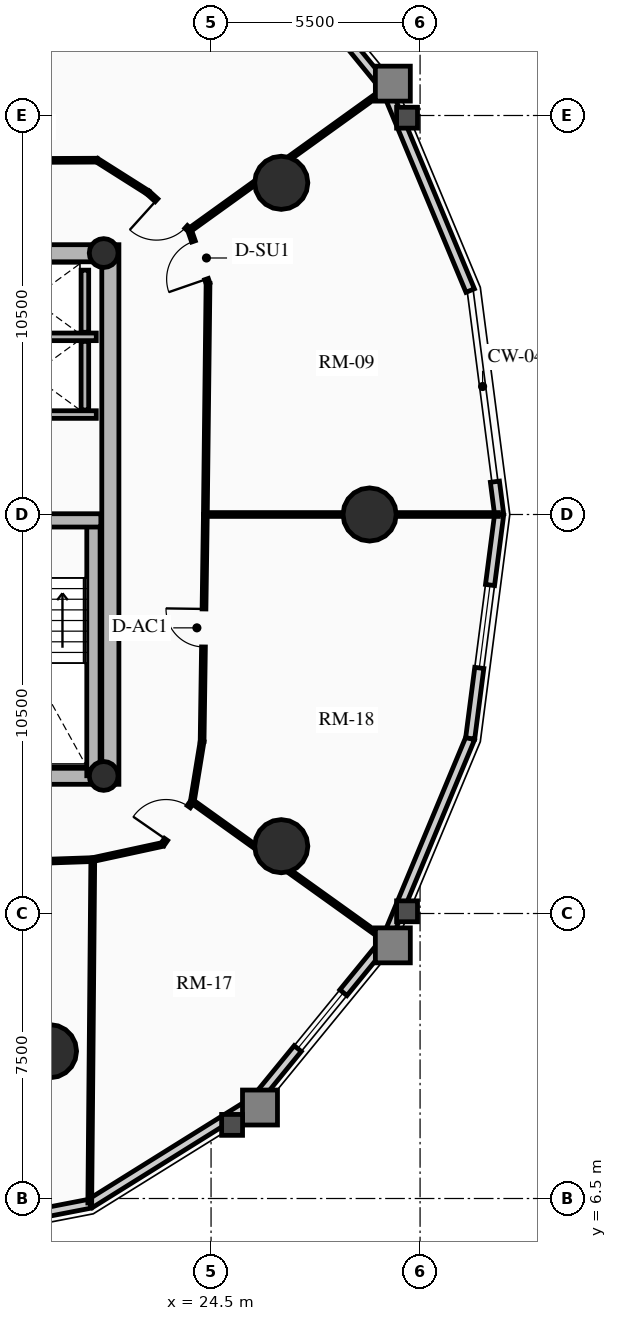
"""IFC4 building model, lengths in metres.
Left out: names, types, materials, properties, quantities, classifications, styles, units other than length and angle.
Written with IfcOpenShell. Run it as: python <this file> out.ifc"""

import sys

from ifc_helpers import new_model, si_unit, direction, frame, frame_2d, origin, origin_2d, place, context, subcontext, project, spatial, rectangle, circle, hollow_circle, extrude, source, transform, mapped, element, fill, save


model = new_model("IFC4")
c1 = context("Model", 3, precision=1e-05, world=origin(), true_north=direction((0.0, 1.0)))
c2 = subcontext(c1, "Body", "Model", "MODEL_VIEW")
j1 = project(units=[si_unit("LENGTHUNIT", "METRE"), si_unit("PLANEANGLEUNIT", "RADIAN")], contexts=[c1])
p1 = place(None, origin())
s1 = spatial("IfcSite", under=j1, at=p1, CompositionType="ELEMENT")
p2 = place(p1, origin())
s2 = spatial("IfcBuilding", under=s1, at=p2, CompositionType="ELEMENT")
p3 = place(p2, frame((0.0, 0.0, 102.16)))
s3 = spatial("IfcBuildingStorey", under=s2, at=p3, CompositionType="ELEMENT", Elevation=102.16)
p4 = place(p3, frame((21.85, 17.4, 0.0), z_axis=(0.0, 0.0, 1.0), x_axis=(0.0, 1.0, 0.0)))
e1 = element("IfcWall", 1, at=p4, inside=s3, PredefinedType="SHEAR", context=c2, shape_type="SweptSolid", body=[
    extrude(rectangle(XDim=14.2, YDim=0.45, at=frame_2d((7.1, 0.0))), origin(), (0.0, 0.0, 1.0), 2.91),
])
p5 = place(p3, frame((11.15, 17.625, 0.0), z_axis=(0.0, 0.0, 1.0), x_axis=(1.0, 0.0, 0.0)))
e2 = element("IfcWall", 2, at=p5, inside=s3, PredefinedType="SHEAR", context=c2, shape_type="SweptSolid", body=[
    extrude(rectangle(XDim=10.7, YDim=0.45, at=frame_2d((5.35, 0.0))), origin(), (0.0, 0.0, 1.0), 2.91),
])
m1 = source(origin(), c2, "Body", "SweptSolid", [
    extrude(rectangle(XDim=1.5, YDim=2.02, at=frame_2d((0.75, 1.01))), frame((0.0, 0.235, 0.0), z_axis=(0.0, -1.0, 0.0), x_axis=(1.0, 0.0, 0.0)), (0.0, 0.0, 1.0), 0.47),
])
p6 = place(p5, frame((5.45, 0.0, 0.0)))
e3 = element("IfcOpeningElement", 3, at=p6, cuts=e2, PredefinedType="OPENING", context=c2, shape_type="MappedRepresentation", body=[
    mapped(m1, transform((0.0, 0.0, 0.0), x_axis=(1.0, 0.0, 0.0), y_axis=(0.0, 1.0, 0.0), z_axis=(0.0, 0.0, 1.0), scale=1.0)),
])
p7 = place(p3, frame((11.15, 31.375, 0.0), z_axis=(0.0, 0.0, 1.0), x_axis=(1.0, 0.0, 0.0)))
e4 = element("IfcWall", 4, at=p7, inside=s3, PredefinedType="SHEAR", context=c2, shape_type="SweptSolid", body=[
    extrude(rectangle(XDim=10.7, YDim=0.45, at=frame_2d((5.35, 0.0))), origin(), (0.0, 0.0, 1.0), 2.91),
])
p8 = place(p7, frame((4.6, 0.0, 0.0)))
e5 = element("IfcOpeningElement", 5, at=p8, cuts=e4, PredefinedType="OPENING", context=c2, shape_type="MappedRepresentation", body=[
    mapped(m1, transform((0.0, 0.0, 0.0), x_axis=(1.0, 0.0, 0.0), y_axis=(0.0, 1.0, 0.0), z_axis=(0.0, 0.0, 1.0), scale=1.0)),
])
p9 = place(p3, frame((21.405, 17.625, 0.0), z_axis=(0.0, 0.0, 1.0), x_axis=(0.0, 1.0, 0.0)))
e6 = element("IfcWall", 6, at=p9, inside=s3, PredefinedType="SHEAR", context=c2, shape_type="SweptSolid", body=[
    extrude(rectangle(XDim=6.72, YDim=0.35, at=frame_2d((3.36, 0.0))), origin(), (0.0, 0.0, 1.0), 2.91),
])
p10 = place(p3, frame((18.315, 24.345, 0.0), z_axis=(0.0, 0.0, 1.0), x_axis=(1.0, 0.0, 0.0)))
e7 = element("IfcWall", 7, at=p10, inside=s3, PredefinedType="SHEAR", context=c2, shape_type="SweptSolid", body=[
    extrude(rectangle(XDim=3.285, YDim=0.35, at=frame_2d((1.643, 0.0))), origin(), (0.0, 0.0, 1.0), 2.91),
])
for number, where, z_axis, x_axis in (
    (8, (21.675, 17.62, 0.0), (0.0, 0.0, 1.0), (1.0, 0.0, 0.0)),
    (9, (21.675, 31.38, 0.0), (0.0, 0.0, 1.0), (1.0, 0.0, 0.0)),
):
    element("IfcColumn", number, at=place(p3, frame(where, z_axis=z_axis, x_axis=x_axis)), inside=s3, PredefinedType="COLUMN", context=c2, shape_type="SweptSolid", body=[
        extrude(hollow_circle(Radius=0.38, WallThickness=0.032, at=origin_2d()), origin(), (0.0, 0.0, 1.0), 2.91),
    ])
for number, where, z_axis, x_axis in (
    (10, (28.672, 24.5, 0.0), (0.0, 0.0, 1.0), (1.0, 0.0, 0.0)),
    (11, (26.347, 33.229, 0.0), (0.0, 0.0, 1.0), (1.0, 0.0, 0.0)),
    (12, (20.261, 10.377, 0.0), (0.0, 0.0, 1.0), (1.0, 0.0, 0.0)),
    (13, (26.347, 15.771, 0.0), (0.0, 0.0, 1.0), (1.0, 0.0, 0.0)),
):
    element("IfcColumn", number, at=place(p3, frame(where, z_axis=z_axis, x_axis=x_axis)), inside=s3, PredefinedType="USERDEFINED", context=c2, shape_type="SweptSolid", body=[
        extrude(circle(Radius=0.7, at=origin_2d()), origin(), (0.0, 0.0, 1.0), 2.91),
    ])
p11 = place(p3, frame((31.969, 25.363, 0.0), z_axis=(0.0, 0.0, 1.0), x_axis=(0.128523364007, -0.991706481225, 0.0)))
e14 = element("IfcWall", 14, at=p11, inside=s3, PredefinedType="SOLIDWALL", context=c2, shape_type="SweptSolid", body=[
    extrude(rectangle(XDim=0.87, YDim=0.24, at=frame_2d((0.435, 0.0))), origin(), (0.0, 0.0, 1.0), 2.655),
])
p12 = place(p3, frame((29.105, 35.709, 0.0), z_axis=(0.0, 0.0, 1.0), x_axis=(0.384344417632, -0.923189779317, 0.0)))
e15 = element("IfcWall", 15, at=p12, inside=s3, PredefinedType="SOLIDWALL", context=c2, shape_type="SweptSolid", body=[
    extrude(rectangle(XDim=5.758, YDim=0.24, at=frame_2d((2.879, 0.0))), origin(), (0.0, 0.0, 1.0), 2.179),
])
p13 = place(p3, frame((25.658, 39.928, 0.0), z_axis=(0.0, 0.0, 1.0), x_axis=(0.632700781152, -0.77439635945, 0.0)))
e16 = element("IfcWall", 16, at=p13, inside=s3, PredefinedType="SOLIDWALL", context=c2, shape_type="SweptSolid", body=[
    extrude(rectangle(XDim=5.448, YDim=0.24, at=frame_2d((2.724, 0.0))), origin(), (0.0, 0.0, 1.0), 2.179),
])
m2 = source(origin(), c2, "Body", "SweptSolid", [
    extrude(rectangle(XDim=1.9, YDim=1.35, at=frame_2d((0.95, 0.675))), frame((0.0, 0.13, 0.0), z_axis=(0.0, -1.0, 0.0), x_axis=(1.0, 0.0, 0.0)), (0.0, 0.0, 1.0), 0.26),
])
p14 = place(p13, frame((1.774, 0.0, 0.65)))
e17 = element("IfcOpeningElement", 17, at=p14, cuts=e16, PredefinedType="OPENING", context=c2, shape_type="MappedRepresentation", body=[
    mapped(m2, transform((0.0, 0.0, 0.0), x_axis=(1.0, 0.0, 0.0), y_axis=(0.0, 1.0, 0.0), z_axis=(0.0, 0.0, 1.0), scale=1.0)),
])
p15 = place(p3, frame((21.315, 6.363, 0.0), z_axis=(0.0, 0.0, 1.0), x_axis=(-0.981723785992, -0.190311344954, 0.0)))
e18 = element("IfcWall", 18, at=p15, inside=s3, PredefinedType="SOLIDWALL", context=c2, shape_type="SweptSolid", body=[
    extrude(rectangle(XDim=4.904, YDim=0.24, at=frame_2d((2.452, 0.0))), origin(), (0.0, 0.0, 1.0), 2.179),
])
p16 = place(p15, frame((1.502, 0.0, 0.65)))
e19 = element("IfcOpeningElement", 19, at=p16, cuts=e18, PredefinedType="OPENING", context=c2, shape_type="MappedRepresentation", body=[
    mapped(m2, transform((0.0, 0.0, 0.0), x_axis=(1.0, 0.0, 0.0), y_axis=(0.0, 1.0, 0.0), z_axis=(0.0, 0.0, 1.0), scale=1.0)),
])
p17 = place(p3, frame((25.658, 9.072, 0.0), z_axis=(0.0, 0.0, 1.0), x_axis=(-0.848520380187, -0.529162701263, 0.0)))
e20 = element("IfcWall", 20, at=p17, inside=s3, PredefinedType="SOLIDWALL", context=c2, shape_type="SweptSolid", body=[
    extrude(rectangle(XDim=5.119, YDim=0.24, at=frame_2d((2.56, 0.0))), origin(), (0.0, 0.0, 1.0), 2.179),
])
p18 = place(p3, frame((29.105, 13.291, 0.0), z_axis=(0.0, 0.0, 1.0), x_axis=(-0.632700781152, -0.77439635945, 0.0)))
e21 = element("IfcWall", 21, at=p18, inside=s3, PredefinedType="SOLIDWALL", context=c2, shape_type="SweptSolid", body=[
    extrude(rectangle(XDim=5.448, YDim=0.24, at=frame_2d((2.724, 0.0))), origin(), (0.0, 0.0, 1.0), 2.179),
])
p19 = place(p18, frame((1.774, 0.0, 0.65)))
e22 = element("IfcOpeningElement", 22, at=p19, cuts=e21, PredefinedType="OPENING", context=c2, shape_type="MappedRepresentation", body=[
    mapped(m2, transform((0.0, 0.0, 0.0), x_axis=(1.0, 0.0, 0.0), y_axis=(0.0, 1.0, 0.0), z_axis=(0.0, 0.0, 1.0), scale=1.0)),
])
p20 = place(p3, frame((31.318, 18.607, 0.0), z_axis=(0.0, 0.0, 1.0), x_axis=(-0.384344417632, -0.923189779317, 0.0)))
e23 = element("IfcWall", 23, at=p20, inside=s3, PredefinedType="SOLIDWALL", context=c2, shape_type="SweptSolid", body=[
    extrude(rectangle(XDim=5.758, YDim=0.24, at=frame_2d((2.879, 0.0))), origin(), (0.0, 0.0, 1.0), 2.179),
])
p21 = place(p3, frame((32.081, 24.5, 0.0), z_axis=(0.0, 0.0, 1.0), x_axis=(-0.128351991996, -0.991728675672, 0.0)))
e24 = element("IfcWall", 24, at=p21, inside=s3, PredefinedType="SOLIDWALL", context=c2, shape_type="SweptSolid", body=[
    extrude(rectangle(XDim=5.942, YDim=0.24, at=frame_2d((2.971, 0.0))), origin(), (0.0, 0.0, 1.0), 2.179),
])
m3 = source(origin(), c2, "Body", "SweptSolid", [
    extrude(rectangle(XDim=2.2, YDim=1.35, at=frame_2d((1.1, 0.675))), frame((0.0, 0.13, 0.0), z_axis=(0.0, -1.0, 0.0), x_axis=(1.0, 0.0, 0.0)), (0.0, 0.0, 1.0), 0.26),
])
p22 = place(p21, frame((1.871, 0.0, 0.65)))
e25 = element("IfcOpeningElement", 25, at=p22, cuts=e24, PredefinedType="OPENING", context=c2, shape_type="MappedRepresentation", body=[
    mapped(m3, transform((0.0, 0.0, 0.0), x_axis=(1.0, 0.0, 0.0), y_axis=(0.0, 1.0, 0.0), z_axis=(0.0, 0.0, 1.0), scale=1.0)),
])
for number, where, z_axis, x_axis in (
    (26, (18.51, 27.13, 0.0), (0.0, 0.0, 1.0), (1.0, 0.0, 0.0)),
    (27, (18.51, 29.175, 0.0), (0.0, 0.0, 1.0), (1.0, 0.0, 0.0)),
):
    element("IfcWall", number, at=place(p3, frame(where, z_axis=z_axis, x_axis=x_axis)), inside=s3, PredefinedType="SHEAR", context=c2, shape_type="SweptSolid", body=[
        extrude(rectangle(XDim=2.97, YDim=0.2, at=frame_2d((1.485, 0.0))), origin(), (0.0, 0.0, 1.0), 2.91),
    ])
p23 = place(p3, frame((21.18, 27.25, 0.0), z_axis=(0.0, 0.0, 1.0), x_axis=(0.0, 1.0, 0.0)))
e28 = element("IfcWall", 28, at=p23, inside=s3, PredefinedType="SHEAR", context=c2, shape_type="SweptSolid", body=[
    extrude(rectangle(XDim=1.805, YDim=0.2, at=frame_2d((0.902, 0.0))), origin(), (0.0, 0.0, 1.0), 2.91),
])
p24 = place(p3, frame((21.18, 29.295, 0.0), z_axis=(0.0, 0.0, 1.0), x_axis=(0.0, 1.0, 0.0)))
e29 = element("IfcWall", 29, at=p24, inside=s3, PredefinedType="SHEAR", context=c2, shape_type="SweptSolid", body=[
    extrude(rectangle(XDim=1.635, YDim=0.2, at=frame_2d((0.817, 0.0))), origin(), (0.0, 0.0, 1.0), 2.91),
])
p25 = place(p3, frame((24.35, 24.5, 0.0), z_axis=(0.0, 0.0, 1.0), x_axis=(0.011520250275, 0.999933639715, 0.0)))
e30 = element("IfcWall", 30, at=p25, inside=s3, PredefinedType="MOVABLE", context=c2, shape_type="SweptSolid", body=[
    extrude(rectangle(XDim=6.082, YDim=0.1, at=frame_2d((3.041, 0.0))), origin(), (0.0, 0.0, 1.0), 2.225),
])
p26 = place(p3, frame((24.42, 30.582, 0.0), z_axis=(0.0, 0.0, 1.0), x_axis=(-0.327437665675, 0.944872782494, 0.0)))
e31 = element("IfcWall", 31, at=p26, inside=s3, PredefinedType="MOVABLE", context=c2, shape_type="SweptSolid", body=[
    extrude(rectangle(XDim=1.487, YDim=0.1, at=frame_2d((0.743, 0.0))), origin(), (0.0, 0.0, 1.0), 2.225),
])
m4 = source(origin(), c2, "Body", "SweptSolid", [
    extrude(rectangle(XDim=1.05, YDim=2.015, at=frame_2d((0.525, 1.007))), frame((0.0, 0.06, 0.0), z_axis=(0.0, -1.0, 0.0), x_axis=(1.0, 0.0, 0.0)), (0.0, 0.0, 1.0), 0.12),
])
p27 = place(p26, frame((0.12, 0.0, 0.0)))
e32 = element("IfcOpeningElement", 32, at=p27, cuts=e31, PredefinedType="OPENING", context=c2, shape_type="MappedRepresentation", body=[
    mapped(m4, transform((0.0, 0.0, 0.0), x_axis=(1.0, 0.0, 0.0), y_axis=(0.0, 1.0, 0.0), z_axis=(0.0, 0.0, 1.0), scale=1.0)),
])
p28 = place(p3, frame((23.933, 31.987, 0.0), z_axis=(0.0, 0.0, 1.0), x_axis=(-0.742471347264, 0.669877823556, 0.0)))
e33 = element("IfcWall", 33, at=p28, inside=s3, PredefinedType="MOVABLE", context=c2, shape_type="SweptSolid", body=[
    extrude(rectangle(XDim=1.476, YDim=0.1, at=frame_2d((0.738, 0.0))), origin(), (0.0, 0.0, 1.0), 2.225),
])
p29 = place(p28, frame((0.12, 0.0, 0.0)))
e34 = element("IfcOpeningElement", 34, at=p29, cuts=e33, PredefinedType="OPENING", context=c2, shape_type="MappedRepresentation", body=[
    mapped(m4, transform((0.0, 0.0, 0.0), x_axis=(1.0, 0.0, 0.0), y_axis=(0.0, 1.0, 0.0), z_axis=(0.0, 0.0, 1.0), scale=1.0)),
])
p30 = place(p3, frame((22.837, 32.976, 0.0), z_axis=(0.0, 0.0, 1.0), x_axis=(-0.844976677144, 0.534803155454, 0.0)))
e35 = element("IfcWall", 35, at=p30, inside=s3, PredefinedType="MOVABLE", context=c2, shape_type="SweptSolid", body=[
    extrude(rectangle(XDim=1.587, YDim=0.1, at=frame_2d((0.793, 0.0))), origin(), (0.0, 0.0, 1.0), 2.225),
])
p31 = place(p3, frame((21.496, 33.824, 0.0), z_axis=(0.0, 0.0, 1.0), x_axis=(-0.999990516754, -0.004355043261, 0.0)))
e36 = element("IfcWall", 36, at=p31, inside=s3, PredefinedType="MOVABLE", context=c2, shape_type="SweptSolid", body=[
    extrude(rectangle(XDim=3.364, YDim=0.1, at=frame_2d((1.682, 0.0))), origin(), (0.0, 0.0, 1.0), 2.225),
])
p32 = place(p3, frame((14.792, 15.191, 0.0), z_axis=(0.0, 0.0, 1.0), x_axis=(0.999405559957, 0.034475015985, 0.0)))
e37 = element("IfcWall", 37, at=p32, inside=s3, PredefinedType="MOVABLE", context=c2, shape_type="SweptSolid", body=[
    extrude(rectangle(XDim=6.6, YDim=0.1, at=frame_2d((3.3, 0.0))), origin(), (0.0, 0.0, 1.0), 2.225),
])
p33 = place(p32, frame((2.775, 0.0, 0.0)))
e38 = element("IfcOpeningElement", 38, at=p33, cuts=e37, PredefinedType="OPENING", context=c2, shape_type="MappedRepresentation", body=[
    mapped(m4, transform((0.0, 0.0, 0.0), x_axis=(1.0, 0.0, 0.0), y_axis=(0.0, 1.0, 0.0), z_axis=(0.0, 0.0, 1.0), scale=1.0)),
])
p34 = place(p3, frame((21.388, 15.418, 0.0), z_axis=(0.0, 0.0, 1.0), x_axis=(0.977297113048, 0.211873435874, 0.0)))
e39 = element("IfcWall", 39, at=p34, inside=s3, PredefinedType="MOVABLE", context=c2, shape_type="SweptSolid", body=[
    extrude(rectangle(XDim=1.877, YDim=0.1, at=frame_2d((0.938, 0.0))), origin(), (0.0, 0.0, 1.0), 2.225),
])
p35 = place(p3, frame((23.222, 15.816, 0.0), z_axis=(0.0, 0.0, 1.0), x_axis=(0.57002280034, 0.821628874306, 0.0)))
e40 = element("IfcWall", 40, at=p35, inside=s3, PredefinedType="MOVABLE", context=c2, shape_type="SweptSolid", body=[
    extrude(rectangle(XDim=1.374, YDim=0.1, at=frame_2d((0.687, 0.0))), origin(), (0.0, 0.0, 1.0), 2.225),
])
p36 = place(p35, frame((0.162, 0.0, 0.0)))
e41 = element("IfcOpeningElement", 41, at=p36, cuts=e40, PredefinedType="OPENING", context=c2, shape_type="MappedRepresentation", body=[
    mapped(m4, transform((0.0, 0.0, 0.0), x_axis=(1.0, 0.0, 0.0), y_axis=(0.0, 1.0, 0.0), z_axis=(0.0, 0.0, 1.0), scale=1.0)),
])
p37 = place(p3, frame((24.006, 16.945, 0.0), z_axis=(0.0, 0.0, 1.0), x_axis=(0.161240753481, 0.986915102436, 0.0)))
e42 = element("IfcWall", 42, at=p37, inside=s3, PredefinedType="MOVABLE", context=c2, shape_type="SweptSolid", body=[
    extrude(rectangle(XDim=1.605, YDim=0.1, at=frame_2d((0.802, 0.0))), origin(), (0.0, 0.0, 1.0), 2.225),
])
p38 = place(p3, frame((24.264, 18.529, 0.0), z_axis=(0.0, 0.0, 1.0), x_axis=(0.014349654938, 0.999897038401, 0.0)))
e43 = element("IfcWall", 43, at=p38, inside=s3, PredefinedType="MOVABLE", context=c2, shape_type="SweptSolid", body=[
    extrude(rectangle(XDim=5.972, YDim=0.1, at=frame_2d((2.986, 0.0))), origin(), (0.0, 0.0, 1.0), 2.655),
])
m5 = source(origin(), c2, "Body", "SweptSolid", [
    extrude(rectangle(XDim=1.0, YDim=2.015, at=frame_2d((0.5, 1.007))), frame((0.0, 0.06, 0.0), z_axis=(0.0, -1.0, 0.0), x_axis=(1.0, 0.0, 0.0)), (0.0, 0.0, 1.0), 0.12),
])
p39 = place(p38, frame((2.486, 0.0, 0.0)))
e44 = element("IfcOpeningElement", 44, at=p39, cuts=e43, PredefinedType="OPENING", context=c2, shape_type="MappedRepresentation", body=[
    mapped(m5, transform((0.0, 0.0, 0.0), x_axis=(1.0, 0.0, 0.0), y_axis=(0.0, 1.0, 0.0), z_axis=(0.0, 0.0, 1.0), scale=1.0)),
])
p40 = place(p3, frame((24.35, 24.5, 0.0), z_axis=(0.0, 0.0, 1.0), x_axis=(1.0, 0.0, 0.0)))
e45 = element("IfcWall", 45, at=p40, inside=s3, PredefinedType="MOVABLE", context=c2, shape_type="SweptSolid", body=[
    extrude(rectangle(XDim=7.711, YDim=0.1, at=frame_2d((3.855, 0.0))), origin(), (0.0, 0.0, 1.0), 2.179),
])
p41 = place(p3, frame((23.933, 31.987, 0.0), z_axis=(0.0, 0.0, 1.0), x_axis=(0.811642946178, 0.584153856377, 0.0)))
e46 = element("IfcWall", 46, at=p41, inside=s3, PredefinedType="MOVABLE", context=c2, shape_type="SweptSolid", body=[
    extrude(rectangle(XDim=6.352, YDim=0.1, at=frame_2d((3.176, 0.0))), origin(), (0.0, 0.0, 1.0), 2.179),
])
p42 = place(p3, frame((21.388, 15.418, 0.0), z_axis=(0.0, 0.0, 1.0), x_axis=(-0.008780834631, -0.999961447728, 0.0)))
e47 = element("IfcWall", 47, at=p42, inside=s3, PredefinedType="MOVABLE", context=c2, shape_type="SweptSolid", body=[
    extrude(rectangle(XDim=9.036, YDim=0.1, at=frame_2d((4.518, 0.0))), origin(), (0.0, 0.0, 1.0), 2.179),
])
p43 = place(p3, frame((24.006, 16.945, 0.0), z_axis=(0.0, 0.0, 1.0), x_axis=(0.81289906925, -0.582404587219, 0.0)))
e48 = element("IfcWall", 48, at=p43, inside=s3, PredefinedType="MOVABLE", context=c2, shape_type="SweptSolid", body=[
    extrude(rectangle(XDim=6.253, YDim=0.1, at=frame_2d((3.127, 0.0))), origin(), (0.0, 0.0, 1.0), 2.179),
])
m6 = source(origin(), c2, "Body", "SweptSolid", [
    extrude(rectangle(XDim=1.9, YDim=1.35, at=frame_2d((0.95, 0.675))), frame((0.0, 0.03, 0.0), z_axis=(0.0, -1.0, 0.0), x_axis=(1.0, 0.0, 0.0)), (0.0, 0.0, 1.0), 0.06),
])
p44 = place(p19, origin())
e49 = element("IfcWindow", 49, at=p44, inside=s3, PartitioningType="DOUBLE_PANEL_VERTICAL", PredefinedType="WINDOW", context=c2, shape_type="MappedRepresentation", body=[
    mapped(m6, transform((0.0, 0.0, 0.0), x_axis=(1.0, 0.0, 0.0), y_axis=(0.0, 1.0, 0.0), z_axis=(0.0, 0.0, 1.0), scale=1.0)),
])
fill(e22, e49)
m7 = source(origin(), c2, "Body", "SweptSolid", [
    extrude(rectangle(XDim=2.2, YDim=1.35, at=frame_2d((1.1, 0.675))), frame((0.0, 0.03, 0.0), z_axis=(0.0, -1.0, 0.0), x_axis=(1.0, 0.0, 0.0)), (0.0, 0.0, 1.0), 0.06),
])
p45 = place(p22, origin())
e50 = element("IfcWindow", 50, at=p45, inside=s3, PartitioningType="DOUBLE_PANEL_VERTICAL", PredefinedType="WINDOW", context=c2, shape_type="MappedRepresentation", body=[
    mapped(m7, transform((0.0, 0.0, 0.0), x_axis=(1.0, 0.0, 0.0), y_axis=(0.0, 1.0, 0.0), z_axis=(0.0, 0.0, 1.0), scale=1.0)),
])
fill(e25, e50)
m8 = source(origin(), c2, "Body", "SweptSolid", [
    extrude(rectangle(XDim=1.05, YDim=2.015, at=frame_2d((0.525, 1.007))), frame((0.0, 0.025, 0.0), z_axis=(0.0, -1.0, 0.0), x_axis=(1.0, 0.0, 0.0)), (0.0, 0.0, 1.0), 0.05),
])
p46 = place(p27, origin())
e51 = element("IfcDoor", 51, at=p46, inside=s3, OperationType="SINGLE_SWING_LEFT", PredefinedType="DOOR", context=c2, shape_type="MappedRepresentation", body=[
    mapped(m8, transform((0.0, 0.0, 0.0), x_axis=(1.0, 0.0, 0.0), y_axis=(0.0, 1.0, 0.0), z_axis=(0.0, 0.0, 1.0), scale=1.0)),
])
fill(e32, e51)
p47 = place(p29, origin())
e52 = element("IfcDoor", 52, at=p47, inside=s3, OperationType="SINGLE_SWING_RIGHT", PredefinedType="DOOR", context=c2, shape_type="MappedRepresentation", body=[
    mapped(m8, transform((0.0, 0.0, 0.0), x_axis=(1.0, 0.0, 0.0), y_axis=(0.0, 1.0, 0.0), z_axis=(0.0, 0.0, 1.0), scale=1.0)),
])
fill(e34, e52)
p48 = place(p36, origin())
e53 = element("IfcDoor", 53, at=p48, inside=s3, OperationType="SINGLE_SWING_LEFT", PredefinedType="DOOR", context=c2, shape_type="MappedRepresentation", body=[
    mapped(m8, transform((0.0, 0.0, 0.0), x_axis=(1.0, 0.0, 0.0), y_axis=(0.0, 1.0, 0.0), z_axis=(0.0, 0.0, 1.0), scale=1.0)),
])
fill(e41, e53)
m9 = source(origin(), c2, "Body", "SweptSolid", [
    extrude(rectangle(XDim=1.0, YDim=2.015, at=frame_2d((0.5, 1.007))), frame((0.0, 0.025, 0.0), z_axis=(0.0, -1.0, 0.0), x_axis=(1.0, 0.0, 0.0)), (0.0, 0.0, 1.0), 0.05),
])
p49 = place(p39, origin())
e54 = element("IfcDoor", 54, at=p49, inside=s3, OperationType="SINGLE_SWING_RIGHT", PredefinedType="DOOR", context=c2, shape_type="MappedRepresentation", body=[
    mapped(m9, transform((0.0, 0.0, 0.0), x_axis=(1.0, 0.0, 0.0), y_axis=(0.0, 1.0, 0.0), z_axis=(0.0, 0.0, 1.0), scale=1.0)),
])
fill(e44, e54)
save(model, sys.argv[1])
